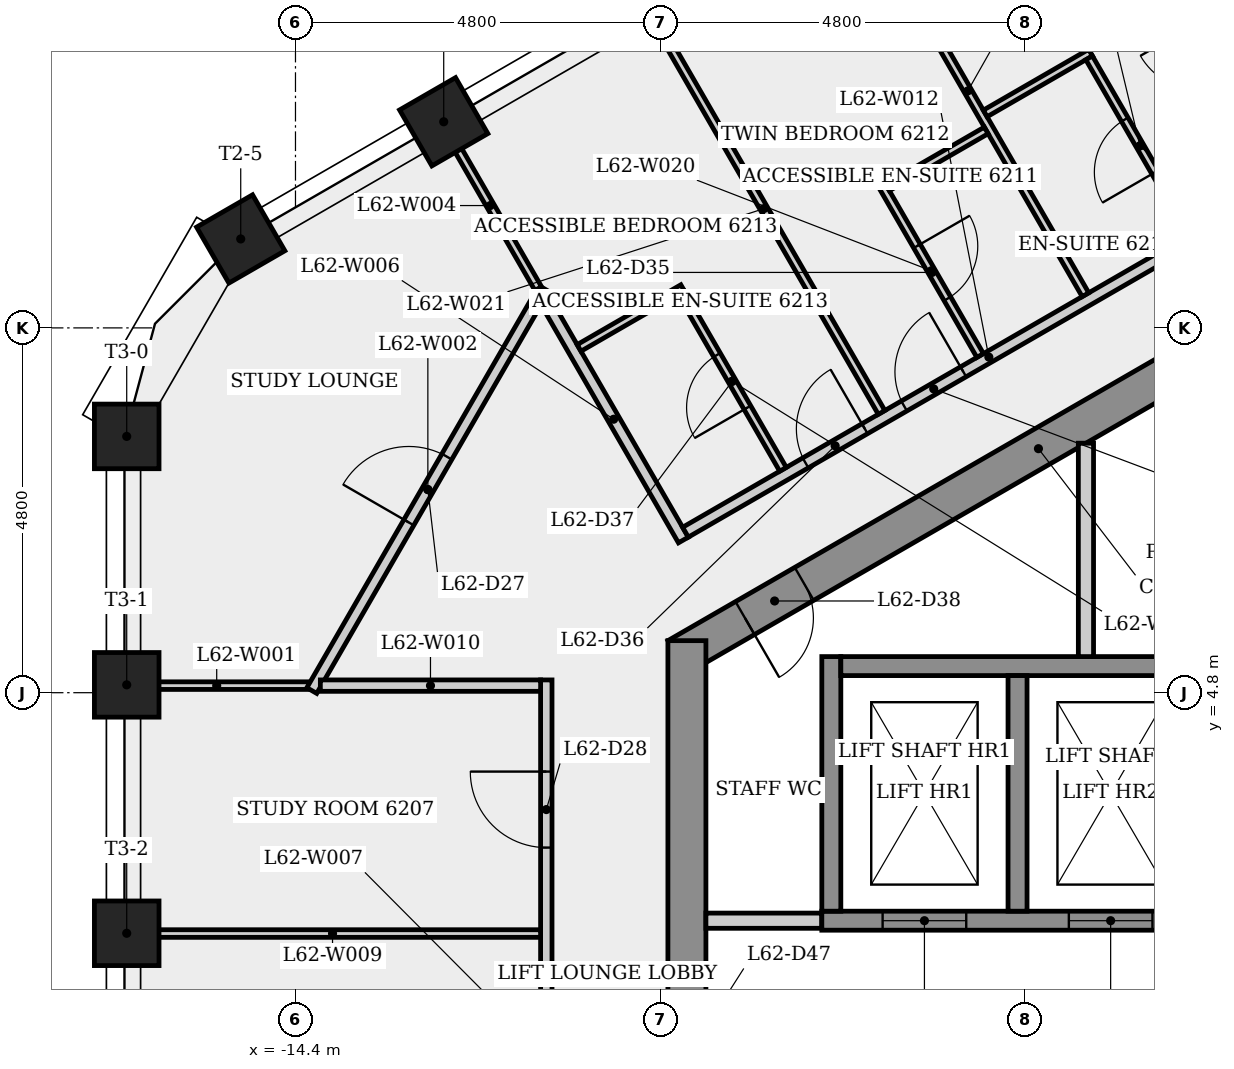
"""IFC4 building model, lengths in metres.
Left out: names, types, materials, properties, quantities, classifications, styles, units other than length and angle.
Written with IfcOpenShell. Run it as: python <this file> out.ifc"""

import sys

from ifc_helpers import new_model, si_unit, direction, frame, frame_2d, origin, origin_2d, place, context, subcontext, project, spatial, rectangle, extrude, element, fill, save


model = new_model("IFC4")
c1 = context("Model", 3, precision=1e-05, world=origin(), true_north=direction((0.0, 1.0)))
c2 = subcontext(c1, "Body", "Model", "MODEL_VIEW")
j1 = project(units=[si_unit("LENGTHUNIT", "METRE"), si_unit("PLANEANGLEUNIT", "RADIAN")], contexts=[c1])
p1 = place(None, origin())
s1 = spatial("IfcSite", under=j1, at=p1, CompositionType="ELEMENT")
p2 = place(p1, origin())
s2 = spatial("IfcBuilding", under=s1, at=p2, CompositionType="ELEMENT")
p3 = place(p2, frame((0.0, 0.0, 232.5)))
s3 = spatial("IfcBuildingStorey", under=s2, at=p3, CompositionType="ELEMENT", Elevation=232.5)
p4 = place(p3, frame((0.125, 10.753, 0.0), z_axis=(0.0, 0.0, 1.0), x_axis=(-0.866023993627, -0.500002442456, 0.0)))
e1 = element("IfcWall", 1, at=p4, inside=s3, PredefinedType="SHEAR", context=c2, shape_type="SweptSolid", body=[
    extrude(rectangle(XDim=10.97, YDim=0.5, at=frame_2d((5.485, 0.0))), origin(), (0.0, 0.0, 1.0), 3.4),
])
p5 = place(p4, frame((9.043, 0.0, 0.0)))
e2 = element("IfcOpeningElement", 2, at=p5, cuts=e1, PredefinedType="OPENING", context=c2, shape_type="SweptSolid", body=[
    extrude(rectangle(XDim=0.9, YDim=2.1, at=frame_2d((0.45, 1.05))), frame((0.0, 0.26, 0.0), z_axis=(0.0, -1.0, 0.0), x_axis=(1.0, 0.0, 0.0)), (0.0, 0.0, 1.0), 0.52),
])
p6 = place(p4, frame((2.38, 0.0, 0.0)))
e3 = element("IfcOpeningElement", 3, at=p6, cuts=e1, PredefinedType="OPENING", context=c2, shape_type="SweptSolid", body=[
    extrude(rectangle(XDim=0.9, YDim=2.1, at=frame_2d((0.45, 1.05))), frame((0.0, 0.26, 0.0), z_axis=(0.0, -1.0, 0.0), x_axis=(1.0, 0.0, 0.0)), (0.0, 0.0, 1.0), 0.52),
])
p7 = place(p3, frame((-9.25, 5.485, 0.0), z_axis=(0.0, 0.0, 1.0), x_axis=(0.0, -1.0, 0.0)))
e4 = element("IfcWall", 4, at=p7, inside=s3, PredefinedType="SHEAR", context=c2, shape_type="SweptSolid", body=[
    extrude(rectangle(XDim=10.97, YDim=0.5, at=frame_2d((5.485, 0.0))), origin(), (0.0, 0.0, 1.0), 3.4),
])
p8 = place(p7, frame((8.51, 0.0, 0.0)))
e5 = element("IfcOpeningElement", 5, at=p8, cuts=e4, PredefinedType="OPENING", context=c2, shape_type="SweptSolid", body=[
    extrude(rectangle(XDim=0.9, YDim=2.1, at=frame_2d((0.45, 1.05))), frame((0.0, 0.26, 0.0), z_axis=(0.0, -1.0, 0.0), x_axis=(1.0, 0.0, 0.0)), (0.0, 0.0, 1.0), 0.52),
])
p9 = place(p7, frame((4.685, 0.0, 0.0)))
e6 = element("IfcOpeningElement", 6, at=p9, cuts=e4, PredefinedType="OPENING", context=c2, shape_type="SweptSolid", body=[
    extrude(rectangle(XDim=1.6, YDim=2.1, at=frame_2d((0.8, 1.05))), frame((0.0, 0.26, 0.0), z_axis=(0.0, -1.0, 0.0), x_axis=(1.0, 0.0, 0.0)), (0.0, 0.0, 1.0), 0.52),
])
for number, where, z_axis, x_axis in (
    (7, (-12.45, 12.312, 0.0), (0.0, 0.0, 1.0), (-0.5, 0.866, 0.0)),
    (8, (-15.12, 10.77, 0.0), (0.0, 0.0, 1.0), (-0.5, 0.866, 0.0)),
    (9, (-16.62, 8.172, 0.0), (0.0, 0.0, 1.0), (-1.0, 0.0, 0.0)),
    (10, (-16.62, 4.903, 0.0), (0.0, 0.0, 1.0), (-1.0, 0.0, 0.0)),
    (11, (-16.62, 1.635, 0.0), (0.0, 0.0, 1.0), (-1.0, 0.0, 0.0)),
):
    element("IfcColumn", number, at=place(p3, frame(where, z_axis=z_axis, x_axis=x_axis)), inside=s3, PredefinedType="COLUMN", context=c2, shape_type="SweptSolid", body=[
        extrude(rectangle(XDim=0.85, YDim=0.85, at=origin_2d()), origin(), (0.0, 0.0, 1.0), 3.4),
    ])
p10 = place(p3, frame((-14.223, 4.893, 0.0), z_axis=(0.0, 0.0, 1.0), x_axis=(-1.0, 0.0, 0.0)))
e12 = element("IfcWall", 12, at=p10, inside=s3, PredefinedType="PARTITIONING", context=c2, shape_type="SweptSolid", body=[
    extrude(rectangle(XDim=2.427, YDim=0.1, at=frame_2d((1.214, 0.0))), origin(), (0.0, 0.0, 1.0), 3.05),
])
p11 = place(p3, frame((-14.185, 4.828, 0.0), z_axis=(0.0, 0.0, 1.0), x_axis=(0.50002117804, 0.866013176292, 0.0)))
e13 = element("IfcWall", 13, at=p11, inside=s3, PredefinedType="PARTITIONING", context=c2, shape_type="SweptSolid", body=[
    extrude(rectangle(XDim=6.108, YDim=0.15, at=frame_2d((3.054, 0.0))), origin(), (0.0, 0.0, 1.0), 3.05),
])
p12 = place(p11, frame((2.554, 0.0, 0.0)))
e14 = element("IfcOpeningElement", 14, at=p12, cuts=e13, PredefinedType="OPENING", context=c2, shape_type="SweptSolid", body=[
    extrude(rectangle(XDim=1.0, YDim=2.1, at=frame_2d((0.5, 1.05))), frame((0.0, 0.085, 0.0), z_axis=(0.0, -1.0, 0.0), x_axis=(1.0, 0.0, 0.0)), (0.0, 0.0, 1.0), 0.17),
])
p13 = place(p3, frame((-12.468, 12.302, 0.0), z_axis=(0.0, 0.0, 1.0), x_axis=(0.500032459767, -0.866006662318, 0.0)))
e15 = element("IfcWall", 15, at=p13, inside=s3, PredefinedType="PARTITIONING", context=c2, shape_type="SweptSolid", body=[
    extrude(rectangle(XDim=2.522, YDim=0.1, at=frame_2d((1.261, 0.0))), origin(), (0.0, 0.0, 1.0), 3.05),
])
p14 = place(p3, frame((-11.131, 9.988, 0.0), z_axis=(0.0, 0.0, 1.0), x_axis=(0.499973899091, -0.866040472627, 0.0)))
e16 = element("IfcWall", 16, at=p14, inside=s3, PredefinedType="PARTITIONING", context=c2, shape_type="SweptSolid", body=[
    extrude(rectangle(XDim=3.67, YDim=0.15, at=frame_2d((1.835, 0.0))), origin(), (0.0, 0.0, 1.0), 3.05),
])
p15 = place(p3, frame((-11.1, -4.893, 0.0), z_axis=(0.0, 0.0, 1.0), x_axis=(0.0, 1.0, 0.0)))
e17 = element("IfcWall", 17, at=p15, inside=s3, PredefinedType="PARTITIONING", context=c2, shape_type="SweptSolid", body=[
    extrude(rectangle(XDim=9.861, YDim=0.15, at=frame_2d((4.931, 0.0))), origin(), (0.0, 0.0, 1.0), 3.05),
])
p16 = place(p15, frame((7.655, 0.0, 0.0)))
e18 = element("IfcOpeningElement", 18, at=p16, cuts=e17, PredefinedType="OPENING", context=c2, shape_type="SweptSolid", body=[
    extrude(rectangle(XDim=1.0, YDim=2.1, at=frame_2d((0.5, 1.05))), frame((0.0, 0.085, 0.0), z_axis=(0.0, -1.0, 0.0), x_axis=(1.0, 0.0, 0.0)), (0.0, 0.0, 1.0), 0.17),
])
p17 = place(p15, frame((4.393, 0.0, 0.0)))
e19 = element("IfcOpeningElement", 19, at=p17, cuts=e17, PredefinedType="OPENING", context=c2, shape_type="SweptSolid", body=[
    extrude(rectangle(XDim=1.0, YDim=2.1, at=frame_2d((0.5, 1.05))), frame((0.0, 0.085, 0.0), z_axis=(0.0, -1.0, 0.0), x_axis=(1.0, 0.0, 0.0)), (0.0, 0.0, 1.0), 0.17),
])
p18 = place(p15, frame((1.131, 0.0, 0.0)))
e20 = element("IfcOpeningElement", 20, at=p18, cuts=e17, PredefinedType="OPENING", context=c2, shape_type="SweptSolid", body=[
    extrude(rectangle(XDim=1.0, YDim=2.1, at=frame_2d((0.5, 1.05))), frame((0.0, 0.085, 0.0), z_axis=(0.0, -1.0, 0.0), x_axis=(1.0, 0.0, 0.0)), (0.0, 0.0, 1.0), 0.17),
])
p19 = place(p3, frame((-11.175, 1.631, 0.0), z_axis=(0.0, 0.0, 1.0), x_axis=(-1.0, 0.0, 0.0)))
e21 = element("IfcWall", 21, at=p19, inside=s3, PredefinedType="PARTITIONING", context=c2, shape_type="SweptSolid", body=[
    extrude(rectangle(XDim=5.475, YDim=0.1, at=frame_2d((2.738, 0.0))), origin(), (0.0, 0.0, 1.0), 3.05),
])
p20 = place(p3, frame((-11.175, 4.893, 0.0), z_axis=(0.0, 0.0, 1.0), x_axis=(-1.0, 0.0, 0.0)))
e22 = element("IfcWall", 22, at=p20, inside=s3, PredefinedType="PARTITIONING", context=c2, shape_type="SweptSolid", body=[
    extrude(rectangle(XDim=2.898, YDim=0.15, at=frame_2d((1.449, 0.0))), origin(), (0.0, 0.0, 1.0), 3.05),
])
p21 = place(p3, frame((-9.305, 10.124, 0.0), z_axis=(0.0, 0.0, 1.0), x_axis=(-0.866069430361, -0.499923735979, 0.0)))
e23 = element("IfcWall", 23, at=p21, inside=s3, PredefinedType="PARTITIONING", context=c2, shape_type="SweptSolid", body=[
    extrude(rectangle(XDim=1.575, YDim=0.1, at=frame_2d((0.788, 0.0))), origin(), (0.0, 0.0, 1.0), 3.05),
])
p22 = place(p3, frame((-9.269, 6.912, 0.0), z_axis=(0.0, 0.0, 1.0), x_axis=(0.866021065666, 0.500007513767, 0.0)))
e24 = element("IfcWall", 24, at=p22, inside=s3, PredefinedType="PARTITIONING", context=c2, shape_type="SweptSolid", body=[
    extrude(rectangle(XDim=9.218, YDim=0.15, at=frame_2d((4.609, 0.0))), origin(), (0.0, 0.0, 1.0), 3.05),
])
p23 = place(p22, frame((3.321, 0.0, 0.0)))
e25 = element("IfcOpeningElement", 25, at=p23, cuts=e24, PredefinedType="OPENING", context=c2, shape_type="SweptSolid", body=[
    extrude(rectangle(XDim=0.9, YDim=2.1, at=frame_2d((0.45, 1.05))), frame((0.0, 0.085, 0.0), z_axis=(0.0, -1.0, 0.0), x_axis=(1.0, 0.0, 0.0)), (0.0, 0.0, 1.0), 0.17),
])
p24 = place(p22, frame((1.824, 0.0, 0.0)))
e26 = element("IfcOpeningElement", 26, at=p24, cuts=e24, PredefinedType="OPENING", context=c2, shape_type="SweptSolid", body=[
    extrude(rectangle(XDim=0.9, YDim=2.1, at=frame_2d((0.45, 1.05))), frame((0.0, 0.085, 0.0), z_axis=(0.0, -1.0, 0.0), x_axis=(1.0, 0.0, 0.0)), (0.0, 0.0, 1.0), 0.17),
])
p25 = place(p3, frame((-9.0, 1.8, 0.0), z_axis=(0.0, 0.0, 1.0), x_axis=(1.0, 0.0, 0.0)))
e27 = element("IfcWall", 27, at=p25, inside=s3, PredefinedType="PARTITIONING", context=c2, shape_type="SweptSolid", body=[
    extrude(rectangle(XDim=1.525, YDim=0.2, at=frame_2d((0.763, 0.0))), origin(), (0.0, 0.0, 1.0), 3.05),
])
p26 = place(p3, frame((-7.986, 7.739, 0.0), z_axis=(0.0, 0.0, 1.0), x_axis=(-0.50003581814, 0.866004723184, 0.0)))
e28 = element("IfcWall", 28, at=p26, inside=s3, PredefinedType="PARTITIONING", context=c2, shape_type="SweptSolid", body=[
    extrude(rectangle(XDim=2.675, YDim=0.1, at=frame_2d((1.337, 0.0))), origin(), (0.0, 0.0, 1.0), 3.05),
])
p27 = place(p26, frame((0.938, 0.0, 0.0)))
e29 = element("IfcOpeningElement", 29, at=p27, cuts=e28, PredefinedType="OPENING", context=c2, shape_type="SweptSolid", body=[
    extrude(rectangle(XDim=0.8, YDim=2.1, at=frame_2d((0.4, 1.05))), frame((0.0, 0.06, 0.0), z_axis=(0.0, -1.0, 0.0), x_axis=(1.0, 0.0, 0.0)), (0.0, 0.0, 1.0), 0.12),
])
p28 = place(p3, frame((-7.475, 1.8, 0.0), z_axis=(0.0, 0.0, 1.0), x_axis=(1.0, 0.0, 0.0)))
e30 = element("IfcWall", 30, at=p28, inside=s3, PredefinedType="SHEAR", context=c2, shape_type="SweptSolid", body=[
    extrude(rectangle(XDim=14.95, YDim=0.25, at=frame_2d((7.475, 0.0))), origin(), (0.0, 0.0, 1.0), 3.05),
])
p29 = place(p28, frame((0.8, 0.0, 0.0)))
e31 = element("IfcOpeningElement", 31, at=p29, cuts=e30, PredefinedType="OPENING", context=c2, shape_type="SweptSolid", body=[
    extrude(rectangle(XDim=1.1, YDim=2.1, at=frame_2d((0.55, 1.05))), frame((0.0, 0.135, 0.0), z_axis=(0.0, -1.0, 0.0), x_axis=(1.0, 0.0, 0.0)), (0.0, 0.0, 1.0), 0.27),
])
p30 = place(p28, frame((3.25, 0.0, 0.0)))
e32 = element("IfcOpeningElement", 32, at=p30, cuts=e30, PredefinedType="OPENING", context=c2, shape_type="SweptSolid", body=[
    extrude(rectangle(XDim=1.1, YDim=2.1, at=frame_2d((0.55, 1.05))), frame((0.0, 0.135, 0.0), z_axis=(0.0, -1.0, 0.0), x_axis=(1.0, 0.0, 0.0)), (0.0, 0.0, 1.0), 0.27),
])
p31 = place(p28, frame((5.7, 0.0, 0.0)))
e33 = element("IfcOpeningElement", 33, at=p31, cuts=e30, PredefinedType="OPENING", context=c2, shape_type="SweptSolid", body=[
    extrude(rectangle(XDim=1.1, YDim=2.1, at=frame_2d((0.55, 1.05))), frame((0.0, 0.135, 0.0), z_axis=(0.0, -1.0, 0.0), x_axis=(1.0, 0.0, 0.0)), (0.0, 0.0, 1.0), 0.27),
])
p32 = place(p28, frame((8.15, 0.0, 0.0)))
e34 = element("IfcOpeningElement", 34, at=p32, cuts=e30, PredefinedType="OPENING", context=c2, shape_type="SweptSolid", body=[
    extrude(rectangle(XDim=1.1, YDim=2.1, at=frame_2d((0.55, 1.05))), frame((0.0, 0.135, 0.0), z_axis=(0.0, -1.0, 0.0), x_axis=(1.0, 0.0, 0.0)), (0.0, 0.0, 1.0), 0.27),
])
p33 = place(p28, frame((10.6, 0.0, 0.0)))
e35 = element("IfcOpeningElement", 35, at=p33, cuts=e30, PredefinedType="OPENING", context=c2, shape_type="SweptSolid", body=[
    extrude(rectangle(XDim=1.1, YDim=2.1, at=frame_2d((0.55, 1.05))), frame((0.0, 0.135, 0.0), z_axis=(0.0, -1.0, 0.0), x_axis=(1.0, 0.0, 0.0)), (0.0, 0.0, 1.0), 0.27),
])
p34 = place(p28, frame((13.05, 0.0, 0.0)))
e36 = element("IfcOpeningElement", 36, at=p34, cuts=e30, PredefinedType="OPENING", context=c2, shape_type="SweptSolid", body=[
    extrude(rectangle(XDim=1.1, YDim=2.1, at=frame_2d((0.55, 1.05))), frame((0.0, 0.135, 0.0), z_axis=(0.0, -1.0, 0.0), x_axis=(1.0, 0.0, 0.0)), (0.0, 0.0, 1.0), 0.27),
])
p35 = place(p3, frame((-7.35, 1.925, 0.0), z_axis=(0.0, 0.0, 1.0), x_axis=(0.0, 1.0, 0.0)))
e37 = element("IfcWall", 37, at=p35, inside=s3, PredefinedType="SHEAR", context=c2, shape_type="SweptSolid", body=[
    extrude(rectangle(XDim=3.35, YDim=0.25, at=frame_2d((1.675, 0.0))), origin(), (0.0, 0.0, 1.0), 3.05),
])
p36 = place(p3, frame((-7.225, 5.15, 0.0), z_axis=(0.0, 0.0, 1.0), x_axis=(1.0, 0.0, 0.0)))
e38 = element("IfcWall", 38, at=p36, inside=s3, PredefinedType="SHEAR", context=c2, shape_type="SweptSolid", body=[
    extrude(rectangle(XDim=14.7, YDim=0.25, at=frame_2d((7.35, 0.0))), origin(), (0.0, 0.0, 1.0), 3.05),
])
p37 = place(p3, frame((-6.679, 11.467, 0.0), z_axis=(0.0, 0.0, 1.0), x_axis=(0.500034319456, -0.866005588531, 0.0)))
e39 = element("IfcWall", 39, at=p37, inside=s3, PredefinedType="PARTITIONING", context=c2, shape_type="SweptSolid", body=[
    extrude(rectangle(XDim=2.575, YDim=0.1, at=frame_2d((1.288, 0.0))), origin(), (0.0, 0.0, 1.0), 3.05),
])
p38 = place(p37, frame((0.913, 0.0, 0.0)))
e40 = element("IfcOpeningElement", 40, at=p38, cuts=e39, PredefinedType="OPENING", context=c2, shape_type="SweptSolid", body=[
    extrude(rectangle(XDim=0.8, YDim=2.1, at=frame_2d((0.4, 1.05))), frame((0.0, 0.06, 0.0), z_axis=(0.0, -1.0, 0.0), x_axis=(1.0, 0.0, 0.0)), (0.0, 0.0, 1.0), 0.12),
])
p39 = place(p3, frame((-6.689, 8.488, 0.0), z_axis=(0.0, 0.0, 1.0), x_axis=(-0.499997752344, 0.866026701465, 0.0)))
e41 = element("IfcWall", 41, at=p39, inside=s3, PredefinedType="PARTITIONING", context=c2, shape_type="SweptSolid", body=[
    extrude(rectangle(XDim=6.192, YDim=0.1, at=frame_2d((3.096, 0.0))), origin(), (0.0, 0.0, 1.0), 3.05),
])
p40 = place(p3, frame((-7.103, 15.399, 0.0), z_axis=(0.0, 0.0, 1.0), x_axis=(0.500027320894, -0.866009629484, 0.0)))
e42 = element("IfcWall", 42, at=p40, inside=s3, PredefinedType="PARTITIONING", context=c2, shape_type="SweptSolid", body=[
    extrude(rectangle(XDim=6.193, YDim=0.1, at=frame_2d((3.096, 0.0))), origin(), (0.0, 0.0, 1.0), 3.05),
])
p41 = place(p3, frame((-5.312, 12.198, 0.0), z_axis=(0.0, 0.0, 1.0), x_axis=(-0.866031096941, -0.499990139034, 0.0)))
e43 = element("IfcWall", 43, at=p41, inside=s3, PredefinedType="PARTITIONING", context=c2, shape_type="SweptSolid", body=[
    extrude(rectangle(XDim=1.5, YDim=0.1, at=frame_2d((0.75, 0.0))), origin(), (0.0, 0.0, 1.0), 3.05),
])
p42 = place(p3, frame((-4.9, 5.025, 0.0), z_axis=(0.0, 0.0, 1.0), x_axis=(0.0, -1.0, 0.0)))
e44 = element("IfcWall", 44, at=p42, inside=s3, PredefinedType="SHEAR", context=c2, shape_type="SweptSolid", body=[
    extrude(rectangle(XDim=3.1, YDim=0.25, at=frame_2d((1.55, 0.0))), origin(), (0.0, 0.0, 1.0), 3.4),
])
p43 = place(p3, frame((-4.0, 8.083, 0.0), z_axis=(0.0, 0.0, 1.0), x_axis=(0.0, -1.0, 0.0)))
e45 = element("IfcWall", 45, at=p43, inside=s3, PredefinedType="PARTITIONING", context=c2, shape_type="SweptSolid", body=[
    extrude(rectangle(XDim=2.808, YDim=0.2, at=frame_2d((1.404, 0.0))), origin(), (0.0, 0.0, 1.0), 3.05),
])
p44 = place(p3, frame((-3.94, 13.221, 0.0), z_axis=(0.0, 0.0, 1.0), x_axis=(-0.866028054938, -0.499995408039, 0.0)))
e46 = element("IfcWall", 46, at=p44, inside=s3, PredefinedType="PARTITIONING", context=c2, shape_type="SweptSolid", body=[
    extrude(rectangle(XDim=1.6, YDim=0.1, at=frame_2d((0.8, 0.0))), origin(), (0.0, 0.0, 1.0), 3.05),
])
p45 = place(p3, frame((-2.621, 10.836, 0.0), z_axis=(0.0, 0.0, 1.0), x_axis=(-0.499967368674, 0.86604424267, 0.0)))
e47 = element("IfcWall", 47, at=p45, inside=s3, PredefinedType="PARTITIONING", context=c2, shape_type="SweptSolid", body=[
    extrude(rectangle(XDim=2.675, YDim=0.1, at=frame_2d((1.337, 0.0))), origin(), (0.0, 0.0, 1.0), 3.05),
])
p46 = place(p45, frame((0.938, 0.0, 0.0)))
e48 = element("IfcOpeningElement", 48, at=p46, cuts=e47, PredefinedType="OPENING", context=c2, shape_type="SweptSolid", body=[
    extrude(rectangle(XDim=0.8, YDim=2.1, at=frame_2d((0.4, 1.05))), frame((0.0, 0.06, 0.0), z_axis=(0.0, -1.0, 0.0), x_axis=(1.0, 0.0, 0.0)), (0.0, 0.0, 1.0), 0.12),
])
p47 = place(p3, frame((-1.474, 11.846, 0.0), z_axis=(0.0, 0.0, 1.0), x_axis=(-0.499989454812, 0.866031491966, 0.0)))
e49 = element("IfcWall", 49, at=p47, inside=s3, PredefinedType="PARTITIONING", context=c2, shape_type="SweptSolid", body=[
    extrude(rectangle(XDim=3.219, YDim=0.15, at=frame_2d((1.609, 0.0))), origin(), (0.0, 0.0, 1.0), 3.05),
])
p48 = place(p47, frame((1.159, 0.0, 0.0)))
e50 = element("IfcOpeningElement", 50, at=p48, cuts=e49, PredefinedType="OPENING", context=c2, shape_type="SweptSolid", body=[
    extrude(rectangle(XDim=0.9, YDim=2.1, at=frame_2d((0.45, 1.05))), frame((0.0, 0.085, 0.0), z_axis=(0.0, -1.0, 0.0), x_axis=(1.0, 0.0, 0.0)), (0.0, 0.0, 1.0), 0.17),
])
p49 = place(p29, origin())
e51 = element("IfcDoor", 51, at=p49, inside=s3, OperationType="SLIDING_TO_LEFT", PredefinedType="DOOR", context=c2, shape_type="SweptSolid", body=[
    extrude(rectangle(XDim=1.1, YDim=2.1, at=frame_2d((0.55, 1.05))), frame((0.0, 0.025, 0.0), z_axis=(0.0, -1.0, 0.0), x_axis=(1.0, 0.0, 0.0)), (0.0, 0.0, 1.0), 0.05),
])
fill(e31, e51)
p50 = place(p30, origin())
e52 = element("IfcDoor", 52, at=p50, inside=s3, OperationType="SLIDING_TO_LEFT", PredefinedType="DOOR", context=c2, shape_type="SweptSolid", body=[
    extrude(rectangle(XDim=1.1, YDim=2.1, at=frame_2d((0.55, 1.05))), frame((0.0, 0.025, 0.0), z_axis=(0.0, -1.0, 0.0), x_axis=(1.0, 0.0, 0.0)), (0.0, 0.0, 1.0), 0.05),
])
fill(e32, e52)
p51 = place(p12, origin())
e53 = element("IfcDoor", 53, at=p51, inside=s3, OperationType="SINGLE_SWING_LEFT", PredefinedType="DOOR", context=c2, shape_type="SweptSolid", body=[
    extrude(rectangle(XDim=1.0, YDim=2.1, at=frame_2d((0.5, 1.05))), frame((0.0, 0.025, 0.0), z_axis=(0.0, -1.0, 0.0), x_axis=(1.0, 0.0, 0.0)), (0.0, 0.0, 1.0), 0.05),
])
fill(e14, e53)
p52 = place(p16, origin())
e54 = element("IfcDoor", 54, at=p52, inside=s3, OperationType="SINGLE_SWING_RIGHT", PredefinedType="DOOR", context=c2, shape_type="SweptSolid", body=[
    extrude(rectangle(XDim=1.0, YDim=2.1, at=frame_2d((0.5, 1.05))), frame((0.0, 0.025, 0.0), z_axis=(0.0, -1.0, 0.0), x_axis=(1.0, 0.0, 0.0)), (0.0, 0.0, 1.0), 0.05),
])
fill(e18, e54)
p53 = place(p46, origin())
e55 = element("IfcDoor", 55, at=p53, inside=s3, OperationType="SINGLE_SWING_LEFT", PredefinedType="DOOR", context=c2, shape_type="SweptSolid", body=[
    extrude(rectangle(XDim=0.8, YDim=2.1, at=frame_2d((0.4, 1.05))), frame((0.0, 0.025, 0.0), z_axis=(0.0, -1.0, 0.0), x_axis=(1.0, 0.0, 0.0)), (0.0, 0.0, 1.0), 0.05),
])
fill(e48, e55)
p54 = place(p23, origin())
e56 = element("IfcDoor", 56, at=p54, inside=s3, OperationType="SINGLE_SWING_RIGHT", PredefinedType="DOOR", context=c2, shape_type="SweptSolid", body=[
    extrude(rectangle(XDim=0.9, YDim=2.1, at=frame_2d((0.45, 1.05))), frame((0.0, 0.025, 0.0), z_axis=(0.0, -1.0, 0.0), x_axis=(1.0, 0.0, 0.0)), (0.0, 0.0, 1.0), 0.05),
])
fill(e25, e56)
p55 = place(p38, origin())
e57 = element("IfcDoor", 57, at=p55, inside=s3, OperationType="SINGLE_SWING_LEFT", PredefinedType="DOOR", context=c2, shape_type="SweptSolid", body=[
    extrude(rectangle(XDim=0.8, YDim=2.1, at=frame_2d((0.4, 1.05))), frame((0.0, 0.025, 0.0), z_axis=(0.0, -1.0, 0.0), x_axis=(1.0, 0.0, 0.0)), (0.0, 0.0, 1.0), 0.05),
])
fill(e40, e57)
p56 = place(p24, origin())
e58 = element("IfcDoor", 58, at=p56, inside=s3, OperationType="SINGLE_SWING_RIGHT", PredefinedType="DOOR", context=c2, shape_type="SweptSolid", body=[
    extrude(rectangle(XDim=0.9, YDim=2.1, at=frame_2d((0.45, 1.05))), frame((0.0, 0.025, 0.0), z_axis=(0.0, -1.0, 0.0), x_axis=(1.0, 0.0, 0.0)), (0.0, 0.0, 1.0), 0.05),
])
fill(e26, e58)
p57 = place(p27, origin())
e59 = element("IfcDoor", 59, at=p57, inside=s3, OperationType="SINGLE_SWING_LEFT", PredefinedType="DOOR", context=c2, shape_type="SweptSolid", body=[
    extrude(rectangle(XDim=0.8, YDim=2.1, at=frame_2d((0.4, 1.05))), frame((0.0, 0.025, 0.0), z_axis=(0.0, -1.0, 0.0), x_axis=(1.0, 0.0, 0.0)), (0.0, 0.0, 1.0), 0.05),
])
fill(e29, e59)
p58 = place(p5, origin())
e60 = element("IfcDoor", 60, at=p58, inside=s3, OperationType="SINGLE_SWING_RIGHT", PredefinedType="DOOR", context=c2, shape_type="SweptSolid", body=[
    extrude(rectangle(XDim=0.9, YDim=2.1, at=frame_2d((0.45, 1.05))), frame((0.0, 0.025, 0.0), z_axis=(0.0, -1.0, 0.0), x_axis=(1.0, 0.0, 0.0)), (0.0, 0.0, 1.0), 0.05),
])
fill(e2, e60)
save(model, sys.argv[1])
